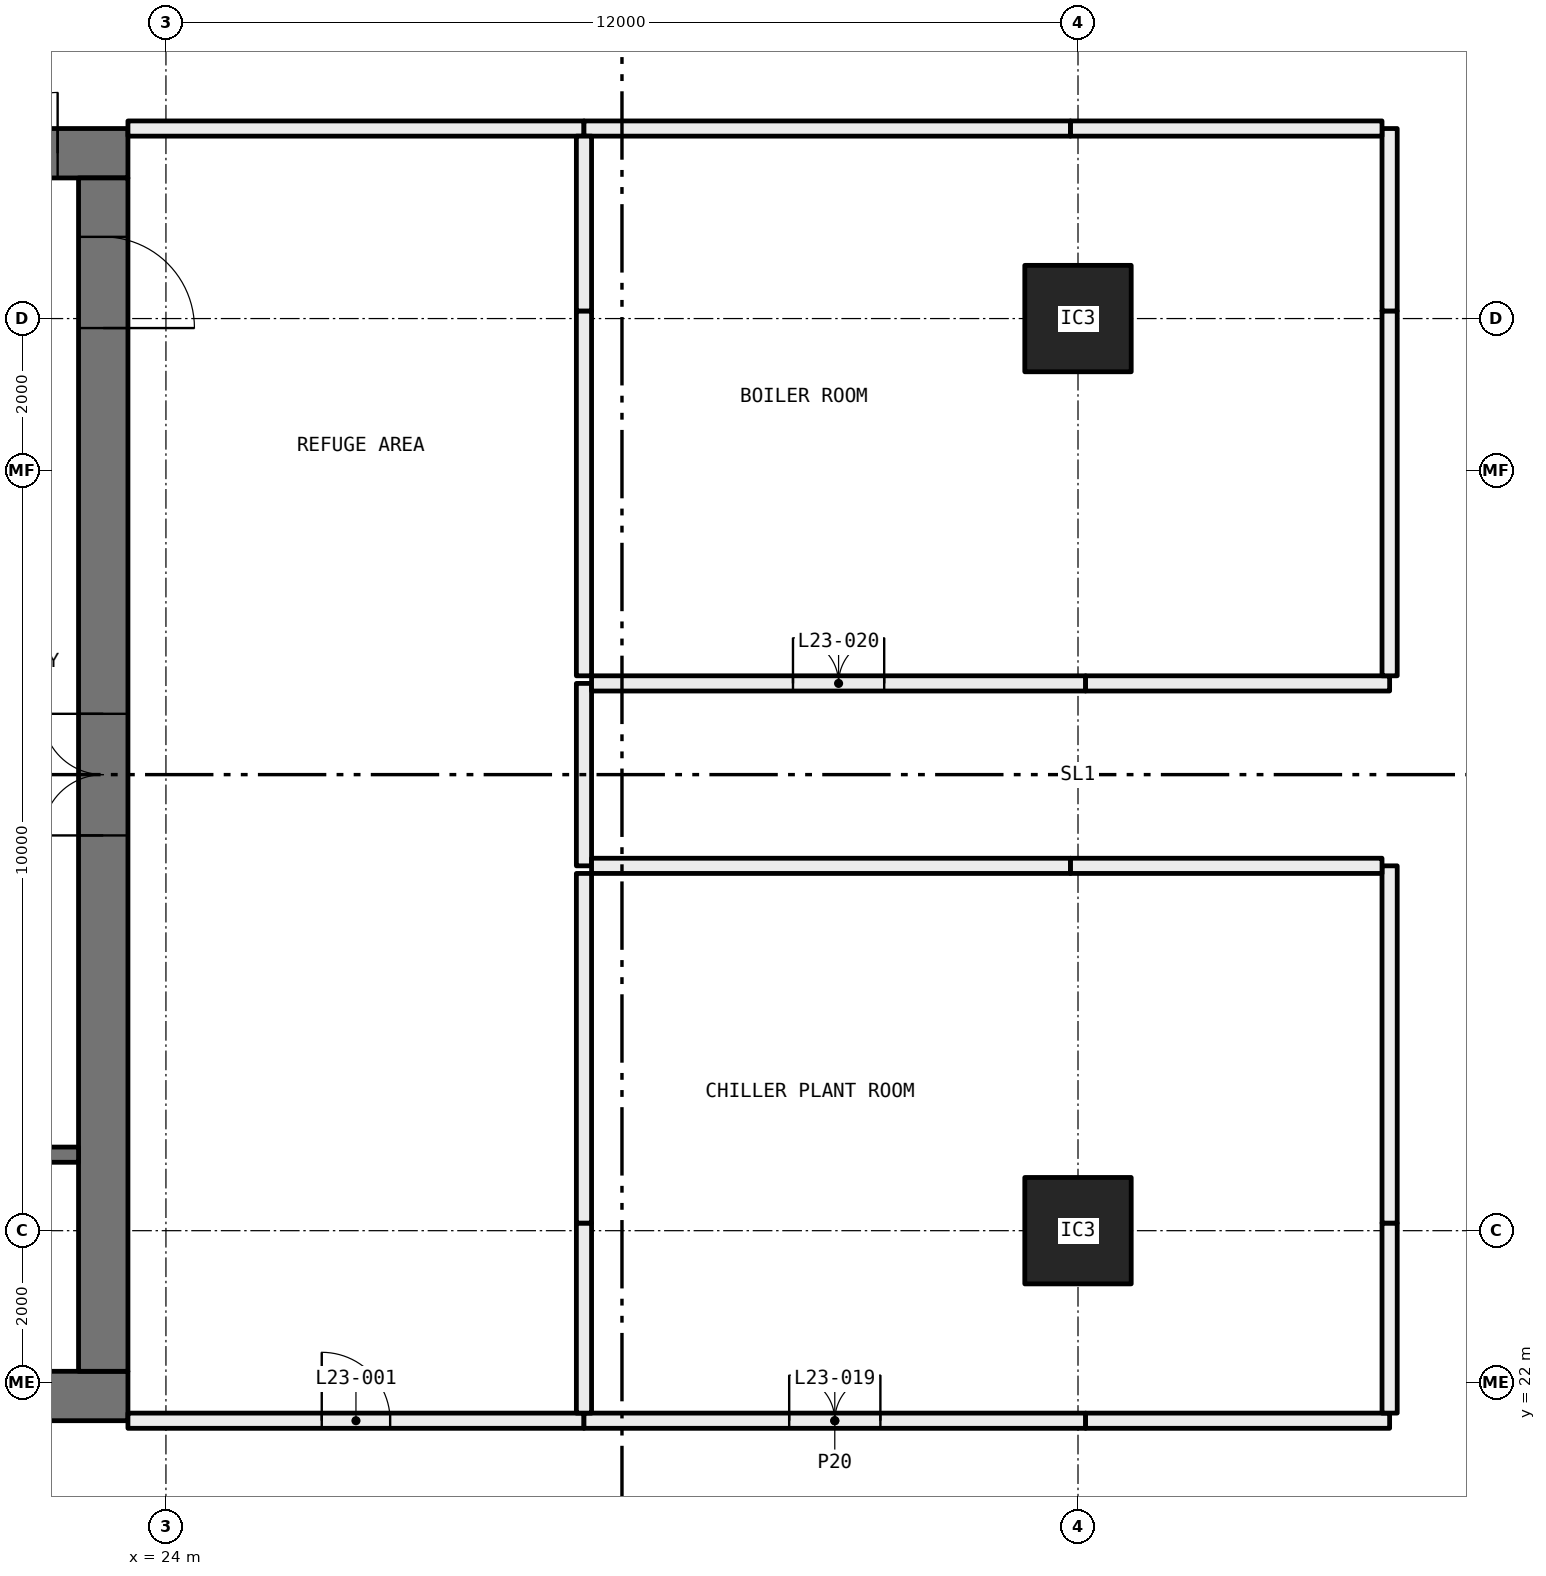
"""IFC4 building model, lengths in metres.
Left out: names, types, materials, properties, quantities, classifications, styles, units other than length and angle.
Written with IfcOpenShell. Run it as: python <this file> out.ifc"""

import sys

from ifc_helpers import new_model, si_unit, direction, frame, frame_2d, origin, origin_2d, place, context, subcontext, project, spatial, rectangle, hollow_rectangle, extrude, element, fill, save


model = new_model("IFC4")
c1 = context("Model", 3, precision=1e-05, world=origin(), true_north=direction((0.0, 1.0)))
c2 = subcontext(c1, "Body", "Model", "MODEL_VIEW")
j1 = project(units=[si_unit("LENGTHUNIT", "METRE"), si_unit("PLANEANGLEUNIT", "RADIAN")], contexts=[c1])
p1 = place(None, origin())
s1 = spatial("IfcSite", under=j1, at=p1, CompositionType="ELEMENT")
p2 = place(p1, origin())
s2 = spatial("IfcBuilding", under=s1, at=p2, CompositionType="ELEMENT")
p3 = place(p2, frame((0.0, 0.0, 92.1)))
s3 = spatial("IfcBuildingStorey", under=s2, at=p3, CompositionType="ELEMENT", Elevation=92.1)
for number, where, z_axis, x_axis in (
    (1, (36.0, 24.0, 0.0), (0.0, 0.0, 1.0), (1.0, 0.0, 0.0)),
    (2, (36.0, 36.0, 0.0), (0.0, 0.0, 1.0), (1.0, 0.0, 0.0)),
):
    element("IfcColumn", number, at=place(p3, frame(where, z_axis=z_axis, x_axis=x_axis)), inside=s3, PredefinedType="COLUMN", context=c2, shape_type="SweptSolid", body=[
        extrude(hollow_rectangle(XDim=1.4, YDim=1.4, WallThickness=0.06, at=origin_2d()), origin(), (0.0, 0.0, 1.0), 4.1),
    ])
p4 = place(p3, frame((23.5, 21.5, 0.0), z_axis=(0.0, 0.0, 1.0), x_axis=(1.0, 0.0, 0.0)))
e3 = element("IfcWall", 3, at=p4, inside=s3, PredefinedType="PARTITIONING", context=c2, shape_type="SweptSolid", body=[
    extrude(rectangle(XDim=6.0, YDim=0.2, at=frame_2d((3.0, 0.0))), origin(), (0.0, 0.0, 1.0), 4.1),
])
p5 = place(p4, frame((2.55, 0.0, 0.0)))
e4 = element("IfcOpeningElement", 4, at=p5, cuts=e3, PredefinedType="OPENING", context=c2, shape_type="SweptSolid", body=[
    extrude(rectangle(XDim=0.9, YDim=2.1, at=frame_2d((0.45, 1.05))), frame((0.0, 0.11, 0.0), z_axis=(0.0, -1.0, 0.0), x_axis=(1.0, 0.0, 0.0)), (0.0, 0.0, 1.0), 0.22),
])
p6 = place(p3, frame((29.5, 38.5, 0.0), z_axis=(0.0, 0.0, 1.0), x_axis=(-1.0, 0.0, 0.0)))
e5 = element("IfcWall", 5, at=p6, inside=s3, PredefinedType="PARTITIONING", context=c2, shape_type="SweptSolid", body=[
    extrude(rectangle(XDim=6.0, YDim=0.2, at=frame_2d((3.0, 0.0))), origin(), (0.0, 0.0, 1.0), 4.1),
])
p7 = place(p3, frame((29.5, 28.8, 0.0), z_axis=(0.0, 0.0, 1.0), x_axis=(0.0, 1.0, 0.0)))
e6 = element("IfcWall", 6, at=p7, inside=s3, PredefinedType="PARTITIONING", context=c2, shape_type="SweptSolid", body=[
    extrude(rectangle(XDim=2.4, YDim=0.2, at=frame_2d((1.2, 0.0))), origin(), (0.0, 0.0, 1.0), 4.1),
])
p8 = place(p3, frame((29.5, 21.5, 0.0), z_axis=(0.0, 0.0, 1.0), x_axis=(1.0, 0.0, 0.0)))
e7 = element("IfcWall", 7, at=p8, inside=s3, PredefinedType="PARTITIONING", context=c2, shape_type="SweptSolid", body=[
    extrude(rectangle(XDim=6.6, YDim=0.2, at=frame_2d((3.3, 0.0))), origin(), (0.0, 0.0, 1.0), 3.5),
])
p9 = place(p8, frame((2.7, 0.0, 0.0)))
e8 = element("IfcOpeningElement", 8, at=p9, cuts=e7, PredefinedType="OPENING", context=c2, shape_type="SweptSolid", body=[
    extrude(rectangle(XDim=1.2, YDim=2.1, at=frame_2d((0.6, 1.05))), frame((0.0, 0.11, 0.0), z_axis=(0.0, -1.0, 0.0), x_axis=(1.0, 0.0, 0.0)), (0.0, 0.0, 1.0), 0.22),
])
p10 = place(p3, frame((36.1, 21.5, 0.0), z_axis=(0.0, 0.0, 1.0), x_axis=(1.0, 0.0, 0.0)))
e9 = element("IfcWall", 9, at=p10, inside=s3, PredefinedType="PARTITIONING", context=c2, shape_type="SweptSolid", body=[
    extrude(rectangle(XDim=4.0, YDim=0.2, at=frame_2d((2.0, 0.0))), origin(), (0.0, 0.0, 1.0), 4.1),
])
p11 = place(p3, frame((40.1, 21.6, 0.0), z_axis=(0.0, 0.0, 1.0), x_axis=(0.0, 1.0, 0.0)))
e10 = element("IfcWall", 10, at=p11, inside=s3, PredefinedType="PARTITIONING", context=c2, shape_type="SweptSolid", body=[
    extrude(rectangle(XDim=2.5, YDim=0.2, at=frame_2d((1.25, 0.0))), origin(), (0.0, 0.0, 1.0), 3.5),
])
p12 = place(p3, frame((40.1, 24.1, 0.0), z_axis=(0.0, 0.0, 1.0), x_axis=(0.0, 1.0, 0.0)))
e11 = element("IfcWall", 11, at=p12, inside=s3, PredefinedType="PARTITIONING", context=c2, shape_type="SweptSolid", body=[
    extrude(rectangle(XDim=4.7, YDim=0.2, at=frame_2d((2.35, 0.0))), origin(), (0.0, 0.0, 1.0), 4.1),
])
p13 = place(p3, frame((40.0, 28.8, 0.0), z_axis=(0.0, 0.0, 1.0), x_axis=(-1.0, 0.0, 0.0)))
e12 = element("IfcWall", 12, at=p13, inside=s3, PredefinedType="PARTITIONING", context=c2, shape_type="SweptSolid", body=[
    extrude(rectangle(XDim=4.1, YDim=0.2, at=frame_2d((2.05, 0.0))), origin(), (0.0, 0.0, 1.0), 3.5),
])
p14 = place(p3, frame((35.9, 28.8, 0.0), z_axis=(0.0, 0.0, 1.0), x_axis=(-1.0, 0.0, 0.0)))
e13 = element("IfcWall", 13, at=p14, inside=s3, PredefinedType="PARTITIONING", context=c2, shape_type="SweptSolid", body=[
    extrude(rectangle(XDim=6.3, YDim=0.2, at=frame_2d((3.15, 0.0))), origin(), (0.0, 0.0, 1.0), 4.1),
])
p15 = place(p3, frame((29.6, 31.2, 0.0), z_axis=(0.0, 0.0, 1.0), x_axis=(1.0, 0.0, 0.0)))
e14 = element("IfcWall", 14, at=p15, inside=s3, PredefinedType="PARTITIONING", context=c2, shape_type="SweptSolid", body=[
    extrude(rectangle(XDim=6.5, YDim=0.2, at=frame_2d((3.25, 0.0))), origin(), (0.0, 0.0, 1.0), 3.5),
])
p16 = place(p15, frame((2.65, 0.0, 0.0)))
e15 = element("IfcOpeningElement", 15, at=p16, cuts=e14, PredefinedType="OPENING", context=c2, shape_type="SweptSolid", body=[
    extrude(rectangle(XDim=1.2, YDim=2.1, at=frame_2d((0.6, 1.05))), frame((0.0, 0.11, 0.0), z_axis=(0.0, -1.0, 0.0), x_axis=(1.0, 0.0, 0.0)), (0.0, 0.0, 1.0), 0.22),
])
p17 = place(p3, frame((36.1, 31.2, 0.0), z_axis=(0.0, 0.0, 1.0), x_axis=(1.0, 0.0, 0.0)))
e16 = element("IfcWall", 16, at=p17, inside=s3, PredefinedType="PARTITIONING", context=c2, shape_type="SweptSolid", body=[
    extrude(rectangle(XDim=4.0, YDim=0.2, at=frame_2d((2.0, 0.0))), origin(), (0.0, 0.0, 1.0), 4.1),
])
p18 = place(p3, frame((40.1, 31.3, 0.0), z_axis=(0.0, 0.0, 1.0), x_axis=(0.0, 1.0, 0.0)))
e17 = element("IfcWall", 17, at=p18, inside=s3, PredefinedType="PARTITIONING", context=c2, shape_type="SweptSolid", body=[
    extrude(rectangle(XDim=4.8, YDim=0.2, at=frame_2d((2.4, 0.0))), origin(), (0.0, 0.0, 1.0), 3.5),
])
p19 = place(p3, frame((40.1, 36.1, 0.0), z_axis=(0.0, 0.0, 1.0), x_axis=(0.0, 1.0, 0.0)))
e18 = element("IfcWall", 18, at=p19, inside=s3, PredefinedType="PARTITIONING", context=c2, shape_type="SweptSolid", body=[
    extrude(rectangle(XDim=2.4, YDim=0.2, at=frame_2d((1.2, 0.0))), origin(), (0.0, 0.0, 1.0), 4.1),
])
p20 = place(p3, frame((40.0, 38.5, 0.0), z_axis=(0.0, 0.0, 1.0), x_axis=(-1.0, 0.0, 0.0)))
e19 = element("IfcWall", 19, at=p20, inside=s3, PredefinedType="PARTITIONING", context=c2, shape_type="SweptSolid", body=[
    extrude(rectangle(XDim=4.1, YDim=0.2, at=frame_2d((2.05, 0.0))), origin(), (0.0, 0.0, 1.0), 3.5),
])
p21 = place(p3, frame((35.9, 38.5, 0.0), z_axis=(0.0, 0.0, 1.0), x_axis=(-1.0, 0.0, 0.0)))
e20 = element("IfcWall", 20, at=p21, inside=s3, PredefinedType="PARTITIONING", context=c2, shape_type="SweptSolid", body=[
    extrude(rectangle(XDim=6.4, YDim=0.2, at=frame_2d((3.2, 0.0))), origin(), (0.0, 0.0, 1.0), 4.1),
])
p22 = place(p3, frame((29.5, 21.6, 0.0), z_axis=(0.0, 0.0, 1.0), x_axis=(0.0, 1.0, 0.0)))
e21 = element("IfcWall", 21, at=p22, inside=s3, PredefinedType="PARTITIONING", context=c2, shape_type="SweptSolid", body=[
    extrude(rectangle(XDim=2.5, YDim=0.2, at=frame_2d((1.25, 0.0))), origin(), (0.0, 0.0, 1.0), 3.5),
])
p23 = place(p3, frame((29.5, 24.1, 0.0), z_axis=(0.0, 0.0, 1.0), x_axis=(0.0, 1.0, 0.0)))
e22 = element("IfcWall", 22, at=p23, inside=s3, PredefinedType="PARTITIONING", context=c2, shape_type="SweptSolid", body=[
    extrude(rectangle(XDim=4.6, YDim=0.2, at=frame_2d((2.3, 0.0))), origin(), (0.0, 0.0, 1.0), 4.1),
])
p24 = place(p3, frame((29.5, 31.3, 0.0), z_axis=(0.0, 0.0, 1.0), x_axis=(0.0, 1.0, 0.0)))
e23 = element("IfcWall", 23, at=p24, inside=s3, PredefinedType="PARTITIONING", context=c2, shape_type="SweptSolid", body=[
    extrude(rectangle(XDim=4.8, YDim=0.2, at=frame_2d((2.4, 0.0))), origin(), (0.0, 0.0, 1.0), 3.5),
])
p25 = place(p3, frame((29.5, 36.1, 0.0), z_axis=(0.0, 0.0, 1.0), x_axis=(0.0, 1.0, 0.0)))
e24 = element("IfcWall", 24, at=p25, inside=s3, PredefinedType="PARTITIONING", context=c2, shape_type="SweptSolid", body=[
    extrude(rectangle(XDim=2.3, YDim=0.2, at=frame_2d((1.15, 0.0))), origin(), (0.0, 0.0, 1.0), 4.1),
])
p26 = place(p3, frame((12.5, 21.825, 0.0), z_axis=(0.0, 0.0, 1.0), x_axis=(1.0, 0.0, 0.0)))
e25 = element("IfcWall", 25, at=p26, inside=s3, PredefinedType="SHEAR", context=c2, shape_type="SweptSolid", body=[
    extrude(rectangle(XDim=11.0, YDim=0.65, at=frame_2d((5.5, 0.0))), origin(), (0.0, 0.0, 1.0), 4.1),
])
p27 = place(p3, frame((12.5, 38.175, 0.0), z_axis=(0.0, 0.0, 1.0), x_axis=(1.0, 0.0, 0.0)))
e26 = element("IfcWall", 26, at=p27, inside=s3, PredefinedType="SHEAR", context=c2, shape_type="SweptSolid", body=[
    extrude(rectangle(XDim=11.0, YDim=0.65, at=frame_2d((5.5, 0.0))), origin(), (0.0, 0.0, 1.0), 4.1),
])
p28 = place(p27, frame((8.475, 0.0, 0.0)))
e27 = element("IfcOpeningElement", 27, at=p28, cuts=e26, PredefinedType="OPENING", context=c2, shape_type="SweptSolid", body=[
    extrude(rectangle(XDim=1.6, YDim=2.1, at=frame_2d((0.8, 1.05))), frame((0.0, 0.335, 0.0), z_axis=(0.0, -1.0, 0.0), x_axis=(1.0, 0.0, 0.0)), (0.0, 0.0, 1.0), 0.67),
])
p29 = place(p3, frame((23.175, 22.15, 0.0), z_axis=(0.0, 0.0, 1.0), x_axis=(0.0, 1.0, 0.0)))
e28 = element("IfcWall", 28, at=p29, inside=s3, PredefinedType="SHEAR", context=c2, shape_type="SweptSolid", body=[
    extrude(rectangle(XDim=15.7, YDim=0.65, at=frame_2d((7.85, 0.0))), origin(), (0.0, 0.0, 1.0), 4.1),
])
p30 = place(p29, frame((7.05, 0.0, 0.0)))
e29 = element("IfcOpeningElement", 29, at=p30, cuts=e28, PredefinedType="OPENING", context=c2, shape_type="SweptSolid", body=[
    extrude(rectangle(XDim=1.6, YDim=2.1, at=frame_2d((0.8, 1.05))), frame((0.0, 0.335, 0.0), z_axis=(0.0, -1.0, 0.0), x_axis=(1.0, 0.0, 0.0)), (0.0, 0.0, 1.0), 0.67),
])
p31 = place(p29, frame((13.725, 0.0, 0.0)))
e30 = element("IfcOpeningElement", 30, at=p31, cuts=e28, PredefinedType="OPENING", context=c2, shape_type="SweptSolid", body=[
    extrude(rectangle(XDim=1.2, YDim=2.1, at=frame_2d((0.6, 1.05))), frame((0.0, 0.335, 0.0), z_axis=(0.0, -1.0, 0.0), x_axis=(1.0, 0.0, 0.0)), (0.0, 0.0, 1.0), 0.67),
])
p32 = place(p3, frame((15.5, 25.0, 0.0), z_axis=(0.0, 0.0, 1.0), x_axis=(1.0, 0.0, 0.0)))
e31 = element("IfcWall", 31, at=p32, inside=s3, PredefinedType="SOLIDWALL", context=c2, shape_type="SweptSolid", body=[
    extrude(rectangle(XDim=7.35, YDim=0.2, at=frame_2d((3.675, 0.0))), origin(), (0.0, 0.0, 1.0), 4.1),
])
p33 = place(p5, origin())
e32 = element("IfcDoor", 32, at=p33, inside=s3, OperationType="SINGLE_SWING_RIGHT", PredefinedType="DOOR", context=c2, shape_type="SweptSolid", body=[
    extrude(rectangle(XDim=0.9, YDim=2.1, at=frame_2d((0.45, 1.05))), frame((0.0, 0.025, 0.0), z_axis=(0.0, -1.0, 0.0), x_axis=(1.0, 0.0, 0.0)), (0.0, 0.0, 1.0), 0.05),
])
fill(e4, e32)
p34 = place(p9, origin())
e33 = element("IfcDoor", 33, at=p34, inside=s3, OperationType="DOUBLE_DOOR_SINGLE_SWING", PredefinedType="DOOR", context=c2, shape_type="SweptSolid", body=[
    extrude(rectangle(XDim=1.2, YDim=2.1, at=frame_2d((0.6, 1.05))), frame((0.0, 0.025, 0.0), z_axis=(0.0, -1.0, 0.0), x_axis=(1.0, 0.0, 0.0)), (0.0, 0.0, 1.0), 0.05),
])
fill(e8, e33)
p35 = place(p16, origin())
e34 = element("IfcDoor", 34, at=p35, inside=s3, OperationType="DOUBLE_DOOR_SINGLE_SWING", PredefinedType="DOOR", context=c2, shape_type="SweptSolid", body=[
    extrude(rectangle(XDim=1.2, YDim=2.1, at=frame_2d((0.6, 1.05))), frame((0.0, 0.025, 0.0), z_axis=(0.0, -1.0, 0.0), x_axis=(1.0, 0.0, 0.0)), (0.0, 0.0, 1.0), 0.05),
])
fill(e15, e34)
p36 = place(p28, origin())
e35 = element("IfcDoor", 35, at=p36, inside=s3, OperationType="DOUBLE_DOOR_SINGLE_SWING", PredefinedType="DOOR", context=c2, shape_type="SweptSolid", body=[
    extrude(rectangle(XDim=1.6, YDim=2.1, at=frame_2d((0.8, 1.05))), frame((0.0, 0.025, 0.0), z_axis=(0.0, -1.0, 0.0), x_axis=(1.0, 0.0, 0.0)), (0.0, 0.0, 1.0), 0.05),
])
fill(e27, e35)
p37 = place(p30, origin())
e36 = element("IfcDoor", 36, at=p37, inside=s3, OperationType="DOUBLE_DOOR_SINGLE_SWING", PredefinedType="DOOR", context=c2, shape_type="SweptSolid", body=[
    extrude(rectangle(XDim=1.6, YDim=2.1, at=frame_2d((0.8, 1.05))), frame((0.0, 0.025, 0.0), z_axis=(0.0, -1.0, 0.0), x_axis=(1.0, 0.0, 0.0)), (0.0, 0.0, 1.0), 0.05),
])
fill(e29, e36)
p38 = place(p31, frame((1.2, 0.0, 0.0), x_axis=(-1.0, 0.0, 0.0)))
e37 = element("IfcDoor", 37, at=p38, inside=s3, OperationType="SINGLE_SWING_LEFT", PredefinedType="DOOR", context=c2, shape_type="SweptSolid", body=[
    extrude(rectangle(XDim=1.2, YDim=2.1, at=frame_2d((0.6, 1.05))), frame((0.0, 0.025, 0.0), z_axis=(0.0, -1.0, 0.0), x_axis=(1.0, 0.0, 0.0)), (0.0, 0.0, 1.0), 0.05),
])
fill(e30, e37)
save(model, sys.argv[1])
